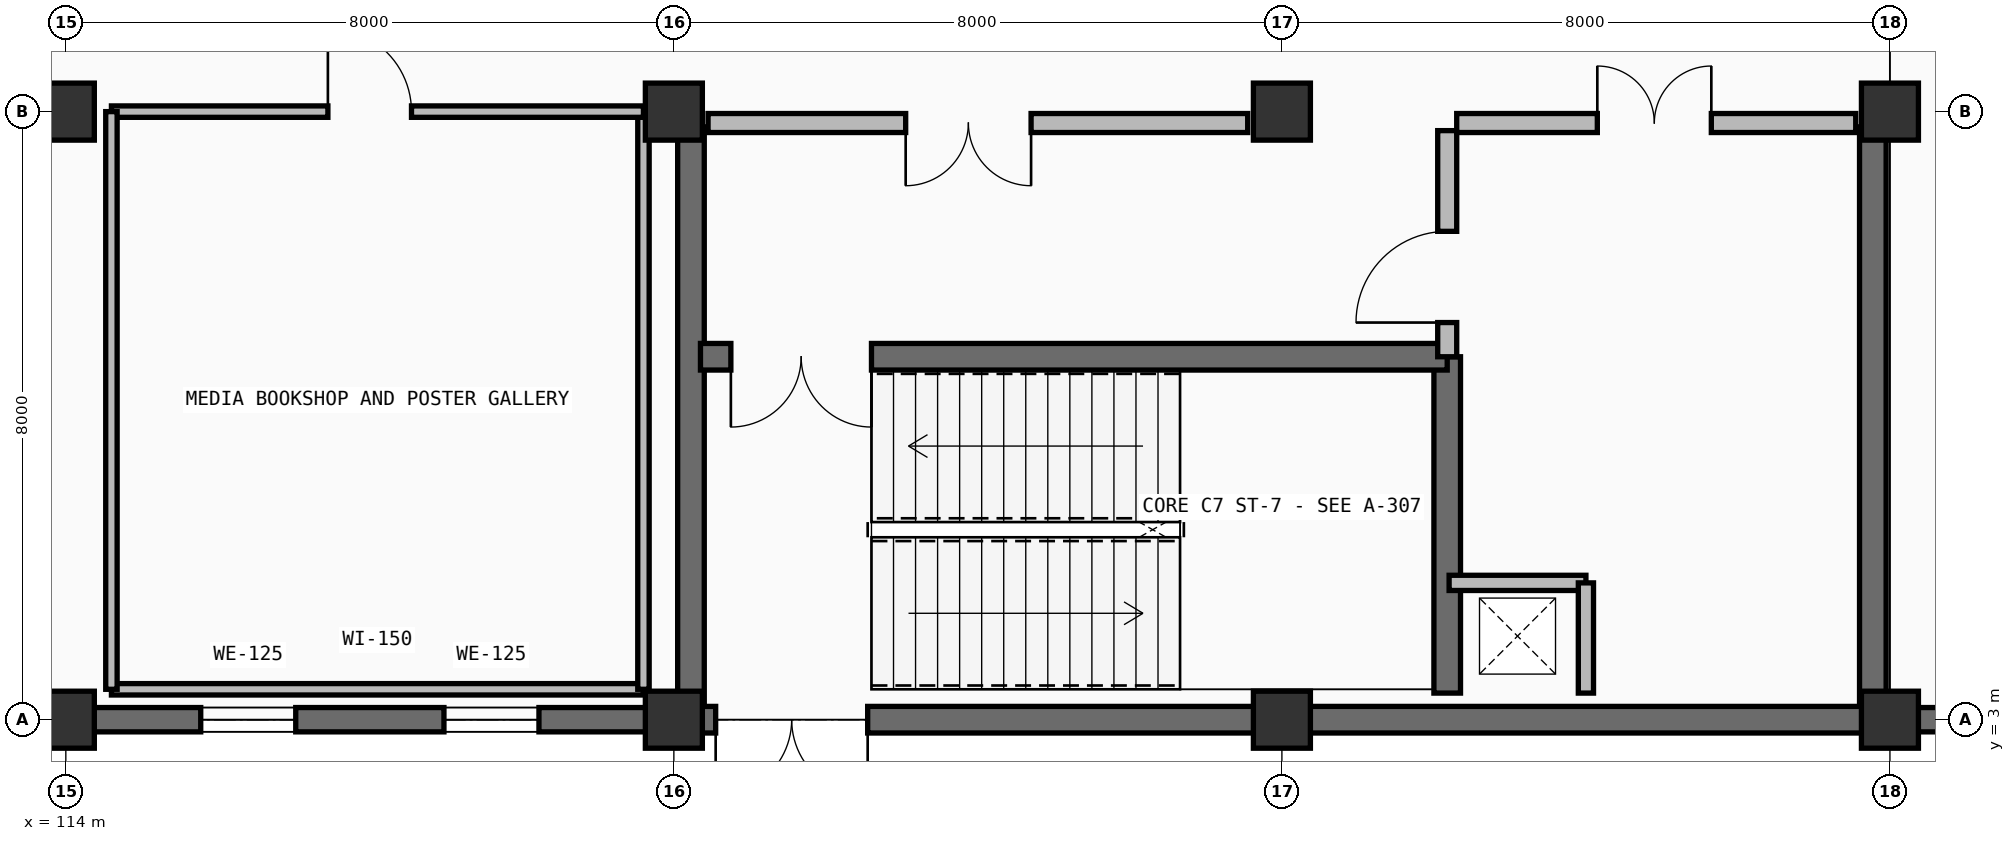
"""IFC4 building model, lengths in metres.
Left out: names, types, materials, properties, quantities, classifications, styles, units other than length and angle.
Written with IfcOpenShell. Run it as: python <this file> out.ifc"""

import sys

from ifc_helpers import new_model, si_unit, direction, frame, frame_2d, origin, origin_2d, place, context, subcontext, project, spatial, rectangle, extrude, element, fill, save


model = new_model("IFC4")
c1 = context("Model", 3, precision=1e-05, world=origin(), true_north=direction((0.0, 1.0)))
c2 = subcontext(c1, "Body", "Model", "MODEL_VIEW")
j1 = project(units=[si_unit("LENGTHUNIT", "METRE"), si_unit("PLANEANGLEUNIT", "RADIAN")], contexts=[c1])
p1 = place(None, origin())
s1 = spatial("IfcSite", under=j1, at=p1, CompositionType="ELEMENT")
p2 = place(p1, origin())
s2 = spatial("IfcBuilding", under=s1, at=p2, CompositionType="ELEMENT")
p3 = place(p2, origin())
s3 = spatial("IfcBuildingStorey", under=s2, at=p3, CompositionType="ELEMENT", Elevation=0.0)
for number, where, z_axis, x_axis in (
    (1, (114.0, 3.0, 0.0), (0.0, 0.0, 1.0), (1.0, 0.0, 0.0)),
    (2, (114.0, 11.0, 0.0), (0.0, 0.0, 1.0), (1.0, 0.0, 0.0)),
    (3, (122.0, 3.0, 0.0), (0.0, 0.0, 1.0), (1.0, 0.0, 0.0)),
    (4, (122.0, 11.0, 0.0), (0.0, 0.0, 1.0), (1.0, 0.0, 0.0)),
    (5, (130.0, 3.0, 0.0), (0.0, 0.0, 1.0), (1.0, 0.0, 0.0)),
    (6, (130.0, 11.0, 0.0), (0.0, 0.0, 1.0), (1.0, 0.0, 0.0)),
    (7, (138.0, 3.0, 0.0), (0.0, 0.0, 1.0), (1.0, 0.0, 0.0)),
    (8, (138.0, 11.0, 0.0), (0.0, 0.0, 1.0), (1.0, 0.0, 0.0)),
):
    element("IfcColumn", number, at=place(p3, frame(where, z_axis=z_axis, x_axis=x_axis)), inside=s3, PredefinedType="COLUMN", context=c2, shape_type="SweptSolid", body=[
        extrude(rectangle(XDim=0.75, YDim=0.75, at=origin_2d()), origin(), (0.0, 0.0, 1.0), 5.4),
    ])
p4 = place(p3, frame((146.0, 3.0, 0.0), z_axis=(0.0, 0.0, 1.0), x_axis=(-1.0, 0.0, 0.0)))
e9 = element("IfcWall", 9, at=p4, inside=s3, PredefinedType="SOLIDWALL", context=c2, shape_type="SweptSolid", body=[
    extrude(rectangle(XDim=8.0, YDim=0.32, at=frame_2d((4.0, 0.0))), origin(), (0.0, 0.0, 1.0), 5.4),
])
p5 = place(p4, frame((1.7, 0.0, 1.0)))
e10 = element("IfcOpeningElement", 10, at=p5, cuts=e9, PredefinedType="OPENING", context=c2, shape_type="SweptSolid", body=[
    extrude(rectangle(XDim=1.4, YDim=1.75, at=frame_2d((0.7, 0.875))), frame((0.0, 0.17, 0.0), z_axis=(0.0, -1.0, 0.0), x_axis=(1.0, 0.0, 0.0)), (0.0, 0.0, 1.0), 0.34),
])
p6 = place(p4, frame((4.9, 0.0, 1.0)))
e11 = element("IfcOpeningElement", 11, at=p6, cuts=e9, PredefinedType="OPENING", context=c2, shape_type="SweptSolid", body=[
    extrude(rectangle(XDim=1.4, YDim=1.75, at=frame_2d((0.7, 0.875))), frame((0.0, 0.17, 0.0), z_axis=(0.0, -1.0, 0.0), x_axis=(1.0, 0.0, 0.0)), (0.0, 0.0, 1.0), 0.34),
])
p7 = place(p3, frame((138.0, 3.0, 0.0), z_axis=(0.0, 0.0, 1.0), x_axis=(-1.0, 0.0, 0.0)))
e12 = element("IfcWall", 12, at=p7, inside=s3, PredefinedType="SHEAR", context=c2, shape_type="SweptSolid", body=[
    extrude(rectangle(XDim=8.0, YDim=0.35, at=frame_2d((4.0, 0.0))), origin(), (0.0, 0.0, 1.0), 5.4),
])
p8 = place(p3, frame((130.0, 3.0, 0.0), z_axis=(0.0, 0.0, 1.0), x_axis=(-1.0, 0.0, 0.0)))
e13 = element("IfcWall", 13, at=p8, inside=s3, PredefinedType="SHEAR", context=c2, shape_type="SweptSolid", body=[
    extrude(rectangle(XDim=8.0, YDim=0.35, at=frame_2d((4.0, 0.0))), origin(), (0.0, 0.0, 1.0), 5.4),
])
p9 = place(p8, frame((5.45, 0.0, 0.0)))
e14 = element("IfcOpeningElement", 14, at=p9, cuts=e13, PredefinedType="OPENING", context=c2, shape_type="SweptSolid", body=[
    extrude(rectangle(XDim=2.0, YDim=2.6, at=frame_2d((1.0, 1.3))), frame((0.0, 0.185, 0.0), z_axis=(0.0, -1.0, 0.0), x_axis=(1.0, 0.0, 0.0)), (0.0, 0.0, 1.0), 0.37),
])
p10 = place(p3, frame((122.0, 3.0, 0.0), z_axis=(0.0, 0.0, 1.0), x_axis=(-1.0, 0.0, 0.0)))
e15 = element("IfcWall", 15, at=p10, inside=s3, PredefinedType="SOLIDWALL", context=c2, shape_type="SweptSolid", body=[
    extrude(rectangle(XDim=8.0, YDim=0.32, at=frame_2d((4.0, 0.0))), origin(), (0.0, 0.0, 1.0), 5.4),
])
p11 = place(p10, frame((1.775, 0.0, 1.0)))
e16 = element("IfcOpeningElement", 16, at=p11, cuts=e15, PredefinedType="OPENING", context=c2, shape_type="SweptSolid", body=[
    extrude(rectangle(XDim=1.25, YDim=1.6, at=frame_2d((0.625, 0.8))), frame((0.0, 0.17, 0.0), z_axis=(0.0, -1.0, 0.0), x_axis=(1.0, 0.0, 0.0)), (0.0, 0.0, 1.0), 0.34),
])
p12 = place(p10, frame((4.975, 0.0, 1.0)))
e17 = element("IfcOpeningElement", 17, at=p12, cuts=e15, PredefinedType="OPENING", context=c2, shape_type="SweptSolid", body=[
    extrude(rectangle(XDim=1.25, YDim=1.6, at=frame_2d((0.625, 0.8))), frame((0.0, 0.17, 0.0), z_axis=(0.0, -1.0, 0.0), x_axis=(1.0, 0.0, 0.0)), (0.0, 0.0, 1.0), 0.34),
])
p13 = place(p3, frame((114.0, 3.0, 0.0), z_axis=(0.0, 0.0, 1.0), x_axis=(-1.0, 0.0, 0.0)))
e18 = element("IfcWall", 18, at=p13, inside=s3, PredefinedType="SOLIDWALL", context=c2, shape_type="SweptSolid", body=[
    extrude(rectangle(XDim=8.0, YDim=0.32, at=frame_2d((4.0, 0.0))), origin(), (0.0, 0.0, 1.0), 5.4),
])
p14 = place(p13, frame((1.85, 0.0, 1.0)))
e19 = element("IfcOpeningElement", 19, at=p14, cuts=e18, PredefinedType="OPENING", context=c2, shape_type="SweptSolid", body=[
    extrude(rectangle(XDim=1.1, YDim=1.45, at=frame_2d((0.55, 0.725))), frame((0.0, 0.17, 0.0), z_axis=(0.0, -1.0, 0.0), x_axis=(1.0, 0.0, 0.0)), (0.0, 0.0, 1.0), 0.34),
])
p15 = place(p13, frame((5.05, 0.0, 1.0)))
e20 = element("IfcOpeningElement", 20, at=p15, cuts=e18, PredefinedType="OPENING", context=c2, shape_type="SweptSolid", body=[
    extrude(rectangle(XDim=1.1, YDim=1.45, at=frame_2d((0.55, 0.725))), frame((0.0, 0.17, 0.0), z_axis=(0.0, -1.0, 0.0), x_axis=(1.0, 0.0, 0.0)), (0.0, 0.0, 1.0), 0.34),
])
p16 = place(p3, frame((122.225, 3.2, 0.0), z_axis=(0.0, 0.0, 1.0), x_axis=(0.0, 1.0, 0.0)))
e21 = element("IfcWall", 21, at=p16, inside=s3, PredefinedType="SHEAR", context=c2, shape_type="SweptSolid", body=[
    extrude(rectangle(XDim=7.6, YDim=0.35, at=frame_2d((3.8, 0.0))), origin(), (0.0, 0.0, 1.0), 5.1),
])
p17 = place(p3, frame((132.175, 3.35, 0.0), z_axis=(0.0, 0.0, 1.0), x_axis=(0.0, 1.0, 0.0)))
e22 = element("IfcWall", 22, at=p17, inside=s3, PredefinedType="SHEAR", context=c2, shape_type="SweptSolid", body=[
    extrude(rectangle(XDim=4.425, YDim=0.35, at=frame_2d((2.212, 0.0))), origin(), (0.0, 0.0, 1.0), 5.1),
])
p18 = place(p3, frame((137.775, 3.2, 0.0), z_axis=(0.0, 0.0, 1.0), x_axis=(0.0, 1.0, 0.0)))
e23 = element("IfcWall", 23, at=p18, inside=s3, PredefinedType="SHEAR", context=c2, shape_type="SweptSolid", body=[
    extrude(rectangle(XDim=7.6, YDim=0.35, at=frame_2d((3.8, 0.0))), origin(), (0.0, 0.0, 1.0), 5.1),
])
p19 = place(p3, frame((132.2, 4.8, 0.0), z_axis=(0.0, 0.0, 1.0), x_axis=(1.0, 0.0, 0.0)))
e24 = element("IfcWall", 24, at=p19, inside=s3, PredefinedType="PARTITIONING", context=c2, shape_type="SweptSolid", body=[
    extrude(rectangle(XDim=1.8, YDim=0.2, at=frame_2d((0.9, 0.0))), origin(), (0.0, 0.0, 1.0), 5.1),
])
p20 = place(p3, frame((134.0, 3.35, 0.0), z_axis=(0.0, 0.0, 1.0), x_axis=(0.0, 1.0, 0.0)))
e25 = element("IfcWall", 25, at=p20, inside=s3, PredefinedType="PARTITIONING", context=c2, shape_type="SweptSolid", body=[
    extrude(rectangle(XDim=1.45, YDim=0.2, at=frame_2d((0.725, 0.0))), origin(), (0.0, 0.0, 1.0), 5.1),
])
p21 = place(p3, frame((122.35, 7.775, 0.0), z_axis=(0.0, 0.0, 1.0), x_axis=(1.0, 0.0, 0.0)))
e26 = element("IfcWall", 26, at=p21, inside=s3, PredefinedType="SHEAR", context=c2, shape_type="SweptSolid", body=[
    extrude(rectangle(XDim=9.825, YDim=0.35, at=frame_2d((4.913, 0.0))), origin(), (0.0, 0.0, 1.0), 5.1),
])
p22 = place(p21, frame((0.4, 0.0, 0.0)))
e27 = element("IfcOpeningElement", 27, at=p22, cuts=e26, PredefinedType="OPENING", context=c2, shape_type="SweptSolid", body=[
    extrude(rectangle(XDim=1.85, YDim=2.25, at=frame_2d((0.925, 1.125))), frame((0.0, 0.185, 0.0), z_axis=(0.0, -1.0, 0.0), x_axis=(1.0, 0.0, 0.0)), (0.0, 0.0, 1.0), 0.37),
])
p23 = place(p3, frame((132.175, 7.775, 0.0), z_axis=(0.0, 0.0, 1.0), x_axis=(0.0, 1.0, 0.0)))
e28 = element("IfcWall", 28, at=p23, inside=s3, PredefinedType="PARTITIONING", context=c2, shape_type="SweptSolid", body=[
    extrude(rectangle(XDim=2.975, YDim=0.25, at=frame_2d((1.488, 0.0))), origin(), (0.0, 0.0, 1.0), 5.1),
])
p24 = place(p23, frame((0.45, 0.0, 0.0)))
e29 = element("IfcOpeningElement", 29, at=p24, cuts=e28, PredefinedType="OPENING", context=c2, shape_type="SweptSolid", body=[
    extrude(rectangle(XDim=1.2, YDim=2.2, at=frame_2d((0.6, 1.1))), frame((0.0, 0.135, 0.0), z_axis=(0.0, -1.0, 0.0), x_axis=(1.0, 0.0, 0.0)), (0.0, 0.0, 1.0), 0.27),
])
p25 = place(p3, frame((122.45, 10.85, 0.0), z_axis=(0.0, 0.0, 1.0), x_axis=(1.0, 0.0, 0.0)))
e30 = element("IfcWall", 30, at=p25, inside=s3, PredefinedType="PARTITIONING", context=c2, shape_type="SweptSolid", body=[
    extrude(rectangle(XDim=7.1, YDim=0.25, at=frame_2d((3.55, 0.0))), origin(), (0.0, 0.0, 1.0), 4.335),
])
p26 = place(p25, frame((2.6, 0.0, 0.0)))
e31 = element("IfcOpeningElement", 31, at=p26, cuts=e30, PredefinedType="OPENING", context=c2, shape_type="SweptSolid", body=[
    extrude(rectangle(XDim=1.65, YDim=2.25, at=frame_2d((0.825, 1.125))), frame((0.0, 0.135, 0.0), z_axis=(0.0, -1.0, 0.0), x_axis=(1.0, 0.0, 0.0)), (0.0, 0.0, 1.0), 0.27),
])
p27 = place(p3, frame((132.3, 10.85, 0.0), z_axis=(0.0, 0.0, 1.0), x_axis=(1.0, 0.0, 0.0)))
e32 = element("IfcWall", 32, at=p27, inside=s3, PredefinedType="PARTITIONING", context=c2, shape_type="SweptSolid", body=[
    extrude(rectangle(XDim=5.25, YDim=0.25, at=frame_2d((2.625, 0.0))), origin(), (0.0, 0.0, 1.0), 4.335),
])
p28 = place(p27, frame((1.85, 0.0, 0.0)))
e33 = element("IfcOpeningElement", 33, at=p28, cuts=e32, PredefinedType="OPENING", context=c2, shape_type="SweptSolid", body=[
    extrude(rectangle(XDim=1.5, YDim=2.2, at=frame_2d((0.75, 1.1))), frame((0.0, 0.135, 0.0), z_axis=(0.0, -1.0, 0.0), x_axis=(1.0, 0.0, 0.0)), (0.0, 0.0, 1.0), 0.27),
])
p29 = place(p3, frame((114.6, 3.4, 0.0), z_axis=(0.0, 0.0, 1.0), x_axis=(1.0, 0.0, 0.0)))
e34 = element("IfcWall", 34, at=p29, inside=s3, PredefinedType="PARTITIONING", context=c2, shape_type="SweptSolid", body=[
    extrude(rectangle(XDim=7.0, YDim=0.15, at=frame_2d((3.5, 0.0))), origin(), (0.0, 0.0, 1.0), 4.405),
])
p30 = place(p3, frame((121.6, 3.4, 0.0), z_axis=(0.0, 0.0, 1.0), x_axis=(0.0, 1.0, 0.0)))
e35 = element("IfcWall", 35, at=p30, inside=s3, PredefinedType="PARTITIONING", context=c2, shape_type="SweptSolid", body=[
    extrude(rectangle(XDim=7.6, YDim=0.15, at=frame_2d((3.8, 0.0))), origin(), (0.0, 0.0, 1.0), 4.385),
])
p31 = place(p3, frame((114.6, 11.0, 0.0), z_axis=(0.0, 0.0, 1.0), x_axis=(1.0, 0.0, 0.0)))
e36 = element("IfcWall", 36, at=p31, inside=s3, PredefinedType="PARTITIONING", context=c2, shape_type="SweptSolid", body=[
    extrude(rectangle(XDim=7.0, YDim=0.15, at=frame_2d((3.5, 0.0))), origin(), (0.0, 0.0, 1.0), 4.335),
])
p32 = place(p31, frame((2.848, 0.0, 0.0)))
e37 = element("IfcOpeningElement", 37, at=p32, cuts=e36, PredefinedType="OPENING", context=c2, shape_type="SweptSolid", body=[
    extrude(rectangle(XDim=1.1, YDim=2.16, at=frame_2d((0.55, 1.08))), frame((0.0, 0.085, 0.0), z_axis=(0.0, -1.0, 0.0), x_axis=(1.0, 0.0, 0.0)), (0.0, 0.0, 1.0), 0.17),
])
p33 = place(p3, frame((114.6, 3.4, 0.0), z_axis=(0.0, 0.0, 1.0), x_axis=(0.0, 1.0, 0.0)))
e38 = element("IfcWall", 38, at=p33, inside=s3, PredefinedType="PARTITIONING", context=c2, shape_type="SweptSolid", body=[
    extrude(rectangle(XDim=7.6, YDim=0.15, at=frame_2d((3.8, 0.0))), origin(), (0.0, 0.0, 1.0), 5.1),
])
p34 = place(p9, origin())
e39 = element("IfcDoor", 39, at=p34, inside=s3, OperationType="DOUBLE_DOOR_SINGLE_SWING", PredefinedType="DOOR", context=c2, shape_type="SweptSolid", body=[
    extrude(rectangle(XDim=2.0, YDim=2.6, at=frame_2d((1.0, 1.3))), frame((0.0, 0.025, 0.0), z_axis=(0.0, -1.0, 0.0), x_axis=(1.0, 0.0, 0.0)), (0.0, 0.0, 1.0), 0.05),
])
fill(e14, e39)
p35 = place(p11, origin())
e40 = element("IfcWindow", 40, at=p35, inside=s3, PartitioningType="SINGLE_PANEL", PredefinedType="WINDOW", context=c2, shape_type="SweptSolid", body=[
    extrude(rectangle(XDim=1.25, YDim=1.6, at=frame_2d((0.625, 0.8))), frame((0.0, 0.03, 0.0), z_axis=(0.0, -1.0, 0.0), x_axis=(1.0, 0.0, 0.0)), (0.0, 0.0, 1.0), 0.06),
])
fill(e16, e40)
p36 = place(p12, origin())
e41 = element("IfcWindow", 41, at=p36, inside=s3, PartitioningType="SINGLE_PANEL", PredefinedType="WINDOW", context=c2, shape_type="SweptSolid", body=[
    extrude(rectangle(XDim=1.25, YDim=1.6, at=frame_2d((0.625, 0.8))), frame((0.0, 0.03, 0.0), z_axis=(0.0, -1.0, 0.0), x_axis=(1.0, 0.0, 0.0)), (0.0, 0.0, 1.0), 0.06),
])
fill(e17, e41)
p37 = place(p22, frame((1.85, 0.0, 0.0), z_axis=(0.0, 0.0, 1.0), x_axis=(-1.0, 0.0, 0.0)))
e42 = element("IfcDoor", 42, at=p37, inside=s3, OperationType="DOUBLE_DOOR_SINGLE_SWING", PredefinedType="DOOR", context=c2, shape_type="SweptSolid", body=[
    extrude(rectangle(XDim=1.85, YDim=2.25, at=frame_2d((0.925, 1.125))), frame((0.0, 0.025, 0.0), z_axis=(0.0, -1.0, 0.0), x_axis=(1.0, 0.0, 0.0)), (0.0, 0.0, 1.0), 0.05),
])
fill(e27, e42)
p38 = place(p24, origin())
e43 = element("IfcDoor", 43, at=p38, inside=s3, OperationType="SINGLE_SWING_LEFT", PredefinedType="DOOR", context=c2, shape_type="SweptSolid", body=[
    extrude(rectangle(XDim=1.2, YDim=2.2, at=frame_2d((0.6, 1.1))), frame((0.0, 0.025, 0.0), z_axis=(0.0, -1.0, 0.0), x_axis=(1.0, 0.0, 0.0)), (0.0, 0.0, 1.0), 0.05),
])
fill(e29, e43)
p39 = place(p26, frame((1.65, 0.0, 0.0), z_axis=(0.0, 0.0, 1.0), x_axis=(-1.0, 0.0, 0.0)))
e44 = element("IfcDoor", 44, at=p39, inside=s3, OperationType="DOUBLE_DOOR_SINGLE_SWING", PredefinedType="DOOR", context=c2, shape_type="SweptSolid", body=[
    extrude(rectangle(XDim=1.65, YDim=2.25, at=frame_2d((0.825, 1.125))), frame((0.0, 0.025, 0.0), z_axis=(0.0, -1.0, 0.0), x_axis=(1.0, 0.0, 0.0)), (0.0, 0.0, 1.0), 0.05),
])
fill(e31, e44)
p40 = place(p28, origin())
e45 = element("IfcDoor", 45, at=p40, inside=s3, OperationType="DOUBLE_DOOR_SINGLE_SWING", PredefinedType="DOOR", context=c2, shape_type="SweptSolid", body=[
    extrude(rectangle(XDim=1.5, YDim=2.2, at=frame_2d((0.75, 1.1))), frame((0.0, 0.025, 0.0), z_axis=(0.0, -1.0, 0.0), x_axis=(1.0, 0.0, 0.0)), (0.0, 0.0, 1.0), 0.05),
])
fill(e33, e45)
p41 = place(p32, origin())
e46 = element("IfcDoor", 46, at=p41, inside=s3, OperationType="SINGLE_SWING_LEFT", PredefinedType="DOOR", context=c2, shape_type="SweptSolid", body=[
    extrude(rectangle(XDim=1.1, YDim=2.16, at=frame_2d((0.55, 1.08))), frame((0.0, 0.025, 0.0), z_axis=(0.0, -1.0, 0.0), x_axis=(1.0, 0.0, 0.0)), (0.0, 0.0, 1.0), 0.05),
])
fill(e37, e46)
save(model, sys.argv[1])
